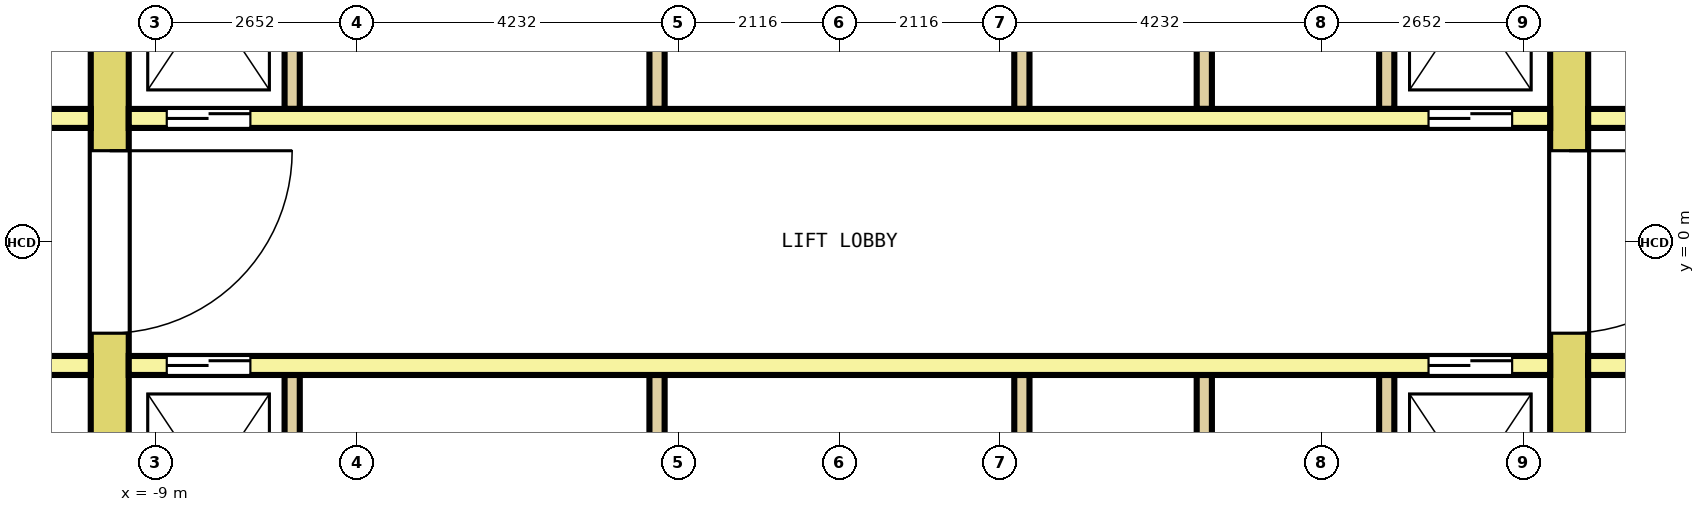
"""IFC4 building model, lengths in metres.
Left out: names, types, materials, properties, quantities, classifications, styles, units other than length and angle.
Written with IfcOpenShell. Run it as: python <this file> out.ifc"""

import sys

from ifc_helpers import new_model, si_unit, direction, frame, frame_2d, origin, place, context, subcontext, project, spatial, rectangle, extrude, element, fill, save


model = new_model("IFC4")
c1 = context("Model", 3, precision=1e-05, world=origin(), true_north=direction((0.0, 1.0)))
c2 = subcontext(c1, "Body", "Model", "MODEL_VIEW")
j1 = project(units=[si_unit("LENGTHUNIT", "METRE"), si_unit("PLANEANGLEUNIT", "RADIAN")], contexts=[c1])
p1 = place(None, origin())
s1 = spatial("IfcSite", under=j1, at=p1, CompositionType="ELEMENT")
p2 = place(p1, origin())
s2 = spatial("IfcBuilding", under=s1, at=p2, CompositionType="ELEMENT")
p3 = place(p2, frame((0.0, 0.0, 49.8)))
s3 = spatial("IfcBuildingStorey", under=s2, at=p3, CompositionType="ELEMENT", Elevation=49.8)
p4 = place(p3, frame((-9.6, -7.7, 0.0), z_axis=(0.0, 0.0, 1.0), x_axis=(0.0, 1.0, 0.0)))
e1 = element("IfcWall", 1, at=p4, inside=s3, PredefinedType="SHEAR", context=c2, shape_type="SweptSolid", body=[
    extrude(rectangle(XDim=15.4, YDim=0.5, at=frame_2d((7.7, 0.0))), origin(), (0.0, 0.0, 1.0), 4.1),
])
p5 = place(p4, frame((6.5, 0.0, 0.0)))
e2 = element("IfcOpeningElement", 2, at=p5, cuts=e1, PredefinedType="OPENING", context=c2, shape_type="SweptSolid", body=[
    extrude(rectangle(XDim=2.4, YDim=2.1, at=frame_2d((1.2, 1.05))), frame((0.0, 0.26, 0.0), z_axis=(0.0, -1.0, 0.0), x_axis=(1.0, 0.0, 0.0)), (0.0, 0.0, 1.0), 0.52),
])
p6 = place(p4, frame((13.4, 0.0, 0.0)))
e3 = element("IfcOpeningElement", 3, at=p6, cuts=e1, PredefinedType="OPENING", context=c2, shape_type="SweptSolid", body=[
    extrude(rectangle(XDim=1.2, YDim=2.1, at=frame_2d((0.6, 1.05))), frame((0.0, 0.26, 0.0), z_axis=(0.0, -1.0, 0.0), x_axis=(1.0, 0.0, 0.0)), (0.0, 0.0, 1.0), 0.52),
])
p7 = place(p4, frame((0.8, 0.0, 0.0)))
e4 = element("IfcOpeningElement", 4, at=p7, cuts=e1, PredefinedType="OPENING", context=c2, shape_type="SweptSolid", body=[
    extrude(rectangle(XDim=1.2, YDim=2.1, at=frame_2d((0.6, 1.05))), frame((0.0, 0.26, 0.0), z_axis=(0.0, -1.0, 0.0), x_axis=(1.0, 0.0, 0.0)), (0.0, 0.0, 1.0), 0.52),
])
p8 = place(p3, frame((9.6, -7.7, 0.0), z_axis=(0.0, 0.0, 1.0), x_axis=(0.0, 1.0, 0.0)))
e5 = element("IfcWall", 5, at=p8, inside=s3, PredefinedType="SHEAR", context=c2, shape_type="SweptSolid", body=[
    extrude(rectangle(XDim=15.4, YDim=0.5, at=frame_2d((7.7, 0.0))), origin(), (0.0, 0.0, 1.0), 4.1),
])
p9 = place(p8, frame((6.5, 0.0, 0.0)))
e6 = element("IfcOpeningElement", 6, at=p9, cuts=e5, PredefinedType="OPENING", context=c2, shape_type="SweptSolid", body=[
    extrude(rectangle(XDim=2.4, YDim=2.1, at=frame_2d((1.2, 1.05))), frame((0.0, 0.26, 0.0), z_axis=(0.0, -1.0, 0.0), x_axis=(1.0, 0.0, 0.0)), (0.0, 0.0, 1.0), 0.52),
])
p10 = place(p8, frame((13.4, 0.0, 0.0)))
e7 = element("IfcOpeningElement", 7, at=p10, cuts=e5, PredefinedType="OPENING", context=c2, shape_type="SweptSolid", body=[
    extrude(rectangle(XDim=1.2, YDim=2.1, at=frame_2d((0.6, 1.05))), frame((0.0, 0.26, 0.0), z_axis=(0.0, -1.0, 0.0), x_axis=(1.0, 0.0, 0.0)), (0.0, 0.0, 1.0), 0.52),
])
p11 = place(p8, frame((0.9, 0.0, 0.0)))
e8 = element("IfcOpeningElement", 8, at=p11, cuts=e5, PredefinedType="OPENING", context=c2, shape_type="SweptSolid", body=[
    extrude(rectangle(XDim=1.0, YDim=2.1, at=frame_2d((0.5, 1.05))), frame((0.0, 0.26, 0.0), z_axis=(0.0, -1.0, 0.0), x_axis=(1.0, 0.0, 0.0)), (0.0, 0.0, 1.0), 0.52),
])
p12 = place(p3, frame((-12.75, 1.625, 0.0), z_axis=(0.0, 0.0, 1.0), x_axis=(1.0, 0.0, 0.0)))
e9 = element("IfcWall", 9, at=p12, inside=s3, PredefinedType="SOLIDWALL", context=c2, shape_type="SweptSolid", body=[
    extrude(rectangle(XDim=2.9, YDim=0.25, at=frame_2d((1.45, 0.0))), origin(), (0.0, 0.0, 1.0), 4.1),
])
p13 = place(p12, frame((0.9, 0.0, 0.0)))
e10 = element("IfcOpeningElement", 10, at=p13, cuts=e9, PredefinedType="OPENING", context=c2, shape_type="SweptSolid", body=[
    extrude(rectangle(XDim=1.1, YDim=2.1, at=frame_2d((0.55, 1.05))), frame((0.0, 0.135, 0.0), z_axis=(0.0, -1.0, 0.0), x_axis=(1.0, 0.0, 0.0)), (0.0, 0.0, 1.0), 0.27),
])
p14 = place(p3, frame((-9.35, 1.625, 0.0), z_axis=(0.0, 0.0, 1.0), x_axis=(1.0, 0.0, 0.0)))
e11 = element("IfcWall", 11, at=p14, inside=s3, PredefinedType="SOLIDWALL", context=c2, shape_type="SweptSolid", body=[
    extrude(rectangle(XDim=18.7, YDim=0.25, at=frame_2d((9.35, 0.0))), origin(), (0.0, 0.0, 1.0), 4.1),
])
p15 = place(p14, frame((0.5, 0.0, 0.0)))
e12 = element("IfcOpeningElement", 12, at=p15, cuts=e11, PredefinedType="OPENING", context=c2, shape_type="SweptSolid", body=[
    extrude(rectangle(XDim=1.1, YDim=2.1, at=frame_2d((0.55, 1.05))), frame((0.0, 0.135, 0.0), z_axis=(0.0, -1.0, 0.0), x_axis=(1.0, 0.0, 0.0)), (0.0, 0.0, 1.0), 0.27),
])
p16 = place(p14, frame((17.1, 0.0, 0.0)))
e13 = element("IfcOpeningElement", 13, at=p16, cuts=e11, PredefinedType="OPENING", context=c2, shape_type="SweptSolid", body=[
    extrude(rectangle(XDim=1.1, YDim=2.1, at=frame_2d((0.55, 1.05))), frame((0.0, 0.135, 0.0), z_axis=(0.0, -1.0, 0.0), x_axis=(1.0, 0.0, 0.0)), (0.0, 0.0, 1.0), 0.27),
])
p17 = place(p3, frame((9.85, 1.625, 0.0), z_axis=(0.0, 0.0, 1.0), x_axis=(1.0, 0.0, 0.0)))
e14 = element("IfcWall", 14, at=p17, inside=s3, PredefinedType="SOLIDWALL", context=c2, shape_type="SweptSolid", body=[
    extrude(rectangle(XDim=2.9, YDim=0.25, at=frame_2d((1.45, 0.0))), origin(), (0.0, 0.0, 1.0), 4.1),
])
p18 = place(p17, frame((0.9, 0.0, 0.0)))
e15 = element("IfcOpeningElement", 15, at=p18, cuts=e14, PredefinedType="OPENING", context=c2, shape_type="SweptSolid", body=[
    extrude(rectangle(XDim=1.1, YDim=2.1, at=frame_2d((0.55, 1.05))), frame((0.0, 0.135, 0.0), z_axis=(0.0, -1.0, 0.0), x_axis=(1.0, 0.0, 0.0)), (0.0, 0.0, 1.0), 0.27),
])
for number, where, z_axis, x_axis in (
    (16, (-7.2, 1.75, 0.0), (0.0, 0.0, 1.0), (0.0, 1.0, 0.0)),
    (17, (-2.4, 1.75, 0.0), (0.0, 0.0, 1.0), (0.0, 1.0, 0.0)),
    (18, (2.4, 1.75, 0.0), (0.0, 0.0, 1.0), (0.0, 1.0, 0.0)),
    (19, (4.8, 1.75, 0.0), (0.0, 0.0, 1.0), (0.0, 1.0, 0.0)),
    (20, (7.2, 1.75, 0.0), (0.0, 0.0, 1.0), (0.0, 1.0, 0.0)),
):
    element("IfcWall", number, at=place(p3, frame(where, z_axis=z_axis, x_axis=x_axis)), inside=s3, PredefinedType="SOLIDWALL", context=c2, shape_type="SweptSolid", body=[
        extrude(rectangle(XDim=2.9, YDim=0.2, at=frame_2d((1.45, 0.0))), origin(), (0.0, 0.0, 1.0), 4.1),
    ])
p19 = place(p3, frame((-12.75, -1.625, 0.0), z_axis=(0.0, 0.0, 1.0), x_axis=(1.0, 0.0, 0.0)))
e21 = element("IfcWall", 21, at=p19, inside=s3, PredefinedType="SOLIDWALL", context=c2, shape_type="SweptSolid", body=[
    extrude(rectangle(XDim=2.9, YDim=0.25, at=frame_2d((1.45, 0.0))), origin(), (0.0, 0.0, 1.0), 4.1),
])
p20 = place(p19, frame((0.9, 0.0, 0.0)))
e22 = element("IfcOpeningElement", 22, at=p20, cuts=e21, PredefinedType="OPENING", context=c2, shape_type="SweptSolid", body=[
    extrude(rectangle(XDim=1.1, YDim=2.1, at=frame_2d((0.55, 1.05))), frame((0.0, 0.135, 0.0), z_axis=(0.0, -1.0, 0.0), x_axis=(1.0, 0.0, 0.0)), (0.0, 0.0, 1.0), 0.27),
])
p21 = place(p3, frame((-9.35, -1.625, 0.0), z_axis=(0.0, 0.0, 1.0), x_axis=(1.0, 0.0, 0.0)))
e23 = element("IfcWall", 23, at=p21, inside=s3, PredefinedType="SOLIDWALL", context=c2, shape_type="SweptSolid", body=[
    extrude(rectangle(XDim=18.7, YDim=0.25, at=frame_2d((9.35, 0.0))), origin(), (0.0, 0.0, 1.0), 4.1),
])
p22 = place(p21, frame((0.5, 0.0, 0.0)))
e24 = element("IfcOpeningElement", 24, at=p22, cuts=e23, PredefinedType="OPENING", context=c2, shape_type="SweptSolid", body=[
    extrude(rectangle(XDim=1.1, YDim=2.1, at=frame_2d((0.55, 1.05))), frame((0.0, 0.135, 0.0), z_axis=(0.0, -1.0, 0.0), x_axis=(1.0, 0.0, 0.0)), (0.0, 0.0, 1.0), 0.27),
])
p23 = place(p21, frame((17.1, 0.0, 0.0)))
e25 = element("IfcOpeningElement", 25, at=p23, cuts=e23, PredefinedType="OPENING", context=c2, shape_type="SweptSolid", body=[
    extrude(rectangle(XDim=1.1, YDim=2.1, at=frame_2d((0.55, 1.05))), frame((0.0, 0.135, 0.0), z_axis=(0.0, -1.0, 0.0), x_axis=(1.0, 0.0, 0.0)), (0.0, 0.0, 1.0), 0.27),
])
p24 = place(p3, frame((9.85, -1.625, 0.0), z_axis=(0.0, 0.0, 1.0), x_axis=(1.0, 0.0, 0.0)))
e26 = element("IfcWall", 26, at=p24, inside=s3, PredefinedType="SOLIDWALL", context=c2, shape_type="SweptSolid", body=[
    extrude(rectangle(XDim=2.9, YDim=0.25, at=frame_2d((1.45, 0.0))), origin(), (0.0, 0.0, 1.0), 4.1),
])
p25 = place(p24, frame((0.9, 0.0, 0.0)))
e27 = element("IfcOpeningElement", 27, at=p25, cuts=e26, PredefinedType="OPENING", context=c2, shape_type="SweptSolid", body=[
    extrude(rectangle(XDim=1.1, YDim=2.1, at=frame_2d((0.55, 1.05))), frame((0.0, 0.135, 0.0), z_axis=(0.0, -1.0, 0.0), x_axis=(1.0, 0.0, 0.0)), (0.0, 0.0, 1.0), 0.27),
])
for number, where, z_axis, x_axis in (
    (28, (-7.2, -4.65, 0.0), (0.0, 0.0, 1.0), (0.0, 1.0, 0.0)),
    (29, (-2.4, -4.65, 0.0), (0.0, 0.0, 1.0), (0.0, 1.0, 0.0)),
    (30, (2.4, -4.65, 0.0), (0.0, 0.0, 1.0), (0.0, 1.0, 0.0)),
    (31, (4.8, -4.65, 0.0), (0.0, 0.0, 1.0), (0.0, 1.0, 0.0)),
    (32, (7.2, -4.65, 0.0), (0.0, 0.0, 1.0), (0.0, 1.0, 0.0)),
):
    element("IfcWall", number, at=place(p3, frame(where, z_axis=z_axis, x_axis=x_axis)), inside=s3, PredefinedType="SOLIDWALL", context=c2, shape_type="SweptSolid", body=[
        extrude(rectangle(XDim=2.9, YDim=0.2, at=frame_2d((1.45, 0.0))), origin(), (0.0, 0.0, 1.0), 4.1),
    ])
p26 = place(p15, origin())
e33 = element("IfcDoor", 33, at=p26, inside=s3, OperationType="DOUBLE_DOOR_SLIDING", PredefinedType="DOOR", context=c2, shape_type="SweptSolid", body=[
    extrude(rectangle(XDim=1.1, YDim=2.1, at=frame_2d((0.55, 1.05))), frame((0.0, 0.075, 0.0), z_axis=(0.0, -1.0, 0.0), x_axis=(1.0, 0.0, 0.0)), (0.0, 0.0, 1.0), 0.15),
])
fill(e12, e33)
p27 = place(p16, origin())
e34 = element("IfcDoor", 34, at=p27, inside=s3, OperationType="DOUBLE_DOOR_SLIDING", PredefinedType="DOOR", context=c2, shape_type="SweptSolid", body=[
    extrude(rectangle(XDim=1.1, YDim=2.1, at=frame_2d((0.55, 1.05))), frame((0.0, 0.075, 0.0), z_axis=(0.0, -1.0, 0.0), x_axis=(1.0, 0.0, 0.0)), (0.0, 0.0, 1.0), 0.15),
])
fill(e13, e34)
p28 = place(p22, origin())
e35 = element("IfcDoor", 35, at=p28, inside=s3, OperationType="DOUBLE_DOOR_SLIDING", PredefinedType="DOOR", context=c2, shape_type="SweptSolid", body=[
    extrude(rectangle(XDim=1.1, YDim=2.1, at=frame_2d((0.55, 1.05))), frame((0.0, 0.075, 0.0), z_axis=(0.0, -1.0, 0.0), x_axis=(1.0, 0.0, 0.0)), (0.0, 0.0, 1.0), 0.15),
])
fill(e24, e35)
p29 = place(p23, origin())
e36 = element("IfcDoor", 36, at=p29, inside=s3, OperationType="DOUBLE_DOOR_SLIDING", PredefinedType="DOOR", context=c2, shape_type="SweptSolid", body=[
    extrude(rectangle(XDim=1.1, YDim=2.1, at=frame_2d((0.55, 1.05))), frame((0.0, 0.075, 0.0), z_axis=(0.0, -1.0, 0.0), x_axis=(1.0, 0.0, 0.0)), (0.0, 0.0, 1.0), 0.15),
])
fill(e25, e36)
p30 = place(p5, origin())
e37 = element("IfcDoor", 37, at=p30, inside=s3, OperationType="DOUBLE_DOOR_SINGLE_SWING", PredefinedType="DOOR", context=c2, shape_type="SweptSolid", body=[
    extrude(rectangle(XDim=2.4, YDim=2.1, at=frame_2d((1.2, 1.05))), frame((0.0, 0.2, 0.0), z_axis=(0.0, -1.0, 0.0), x_axis=(1.0, 0.0, 0.0)), (0.0, 0.0, 1.0), 0.4),
])
fill(e2, e37)
p31 = place(p9, origin())
e38 = element("IfcDoor", 38, at=p31, inside=s3, OperationType="DOUBLE_DOOR_SINGLE_SWING", PredefinedType="DOOR", context=c2, shape_type="SweptSolid", body=[
    extrude(rectangle(XDim=2.4, YDim=2.1, at=frame_2d((1.2, 1.05))), frame((0.0, 0.2, 0.0), z_axis=(0.0, -1.0, 0.0), x_axis=(1.0, 0.0, 0.0)), (0.0, 0.0, 1.0), 0.4),
])
fill(e6, e38)
save(model, sys.argv[1])
